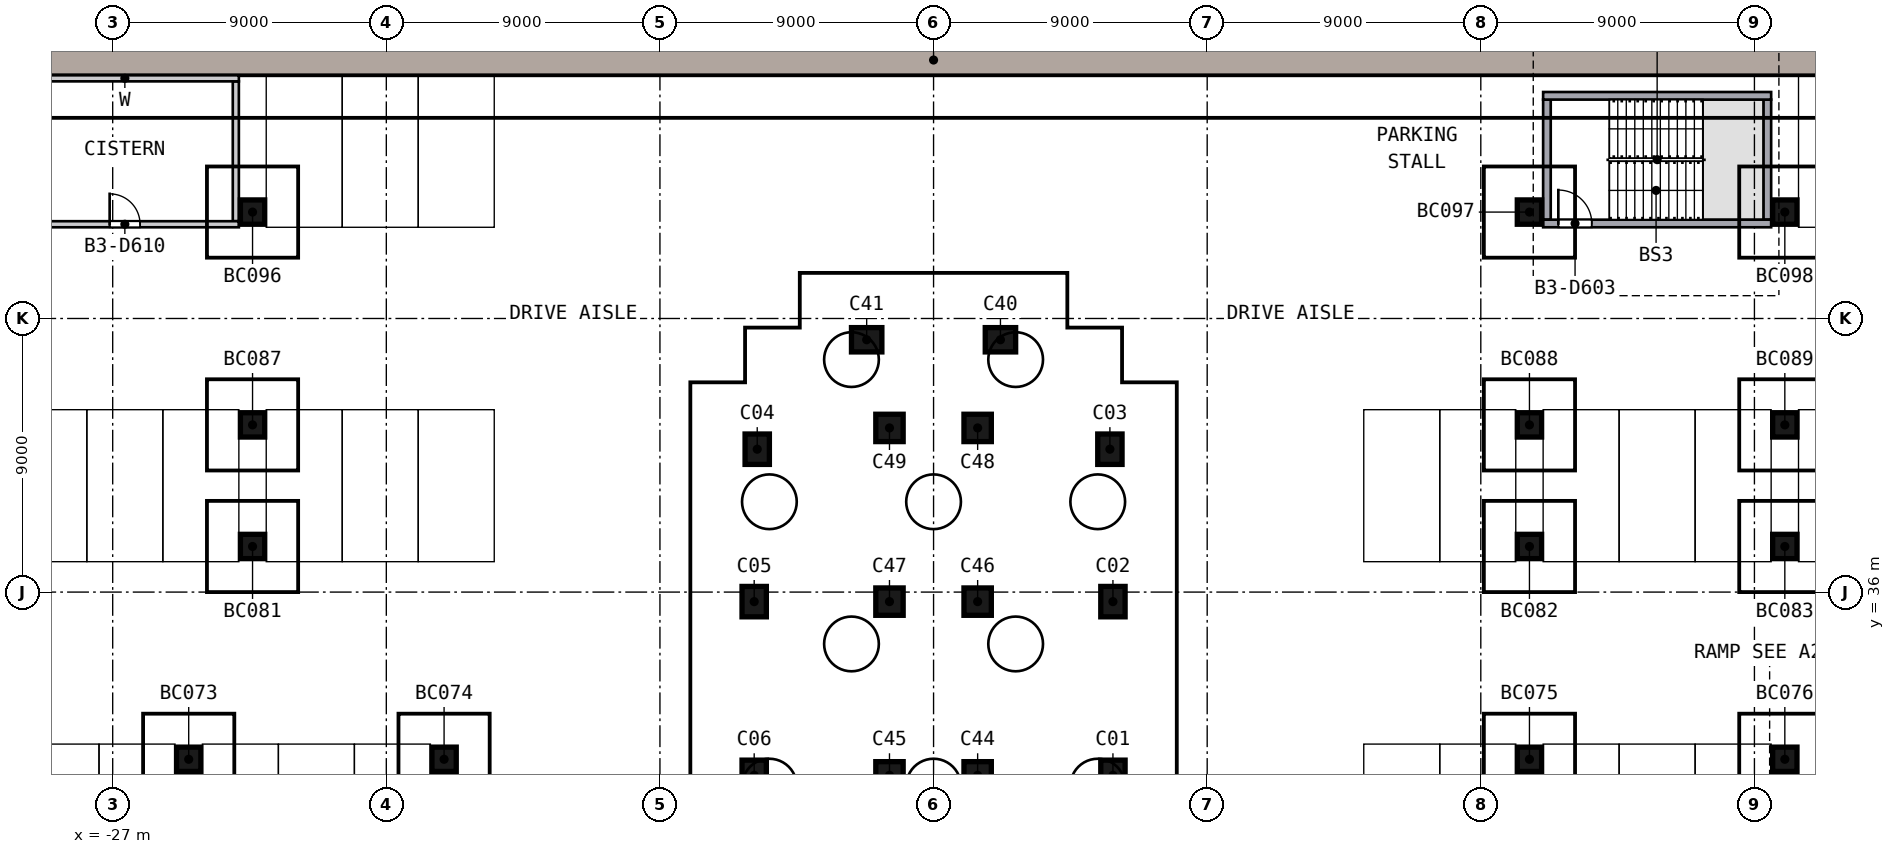
"""IFC4 building model, lengths in metres.
Left out: names, types, materials, properties, quantities, classifications, styles, units other than length and angle.
Written with IfcOpenShell. Run it as: python <this file> out.ifc"""

import sys

from ifc_helpers import new_model, si_unit, direction, frame, frame_2d, origin, origin_2d, place, context, subcontext, project, spatial, polyline, rectangle, outline, extrude, element, fill, save


model = new_model("IFC4")
c1 = context("Model", 3, precision=1e-05, world=origin(), true_north=direction((0.0, 1.0)))
c2 = subcontext(c1, "Body", "Model", "MODEL_VIEW")
j1 = project(units=[si_unit("LENGTHUNIT", "METRE"), si_unit("PLANEANGLEUNIT", "RADIAN")], contexts=[c1])
p1 = place(None, origin())
s1 = spatial("IfcSite", under=j1, at=p1, CompositionType="ELEMENT")
p2 = place(p1, origin())
s2 = spatial("IfcBuilding", under=s1, at=p2, CompositionType="ELEMENT")
p3 = place(p2, frame((0.0, 0.0, -11.7)))
s3 = spatial("IfcBuildingStorey", under=s2, at=p3, CompositionType="ELEMENT", Elevation=-11.7)
for number, where, z_axis, x_axis in (
    (1, (5.9, 29.972, 0.0), (0.0, 0.0, 1.0), (0.0, 1.0, 0.0)),
    (2, (5.9, 35.686, 0.0), (0.0, 0.0, 1.0), (0.0, 1.0, 0.0)),
    (3, (5.8, 40.7, 0.0), (0.0, 0.0, 1.0), (0.0, 1.0, 0.0)),
    (4, (-5.8, 40.7, 0.0), (0.0, 0.0, 1.0), (0.0, -1.0, 0.0)),
    (5, (-5.9, 35.686, 0.0), (0.0, 0.0, 1.0), (0.0, -1.0, 0.0)),
    (6, (-5.9, 29.972, 0.0), (0.0, 0.0, 1.0), (0.0, -1.0, 0.0)),
    (7, (2.2, 44.3, 0.0), (0.0, 0.0, 1.0), (-1.0, 0.0, 0.0)),
    (8, (-2.2, 44.3, 0.0), (0.0, 0.0, 1.0), (-1.0, 0.0, 0.0)),
):
    element("IfcColumn", number, at=place(p3, frame(where, z_axis=z_axis, x_axis=x_axis)), inside=s3, PredefinedType="COLUMN", context=c2, shape_type="SweptSolid", body=[
        extrude(rectangle(XDim=1.0, YDim=0.8, at=origin_2d()), origin(), (0.0, 0.0, 1.0), 3.45),
    ])
for number, where, z_axis, x_axis in (
    (9, (1.45, 29.972, 0.0), (0.0, 0.0, 1.0), (0.0, 1.0, 0.0)),
    (10, (-1.45, 29.972, 0.0), (0.0, 0.0, 1.0), (0.0, 1.0, 0.0)),
    (11, (1.45, 35.686, 0.0), (0.0, 0.0, 1.0), (0.0, 1.0, 0.0)),
    (12, (-1.45, 35.686, 0.0), (0.0, 0.0, 1.0), (0.0, 1.0, 0.0)),
    (13, (1.45, 41.4, 0.0), (0.0, 0.0, 1.0), (0.0, 1.0, 0.0)),
    (14, (-1.45, 41.4, 0.0), (0.0, 0.0, 1.0), (0.0, 1.0, 0.0)),
):
    element("IfcColumn", number, at=place(p3, frame(where, z_axis=z_axis, x_axis=x_axis)), inside=s3, PredefinedType="COLUMN", context=c2, shape_type="SweptSolid", body=[
        extrude(rectangle(XDim=0.9, YDim=0.9, at=origin_2d()), origin(), (0.0, 0.0, 1.0), 3.45),
    ])
p4 = place(p3, frame((0.0, 0.0, -0.8)))
e15 = element("IfcWall", 15, at=p4, inside=s3, PredefinedType="SOLIDWALL", context=c2, shape_type="SweptSolid", body=[
    extrude(outline(polyline([(54.0, 54.0), (-54.0, 54.0), (-53.0, 53.0), (53.0, 53.0), (54.0, 54.0)])), origin(), (0.0, 0.0, 1.0), 4.7),
])
for number, where, z_axis, x_axis in (
    (16, (-24.5, 30.5, -0.8), (0.0, 0.0, 1.0), (1.0, 0.0, 0.0)),
    (17, (-16.1, 30.5, -0.8), (0.0, 0.0, 1.0), (1.0, 0.0, 0.0)),
    (18, (19.6, 30.5, -0.8), (0.0, 0.0, 1.0), (1.0, 0.0, 0.0)),
    (19, (28.0, 30.5, -0.8), (0.0, 0.0, 1.0), (1.0, 0.0, 0.0)),
    (20, (-22.4, 37.5, -0.8), (0.0, 0.0, 1.0), (1.0, 0.0, 0.0)),
    (21, (19.6, 37.5, -0.8), (0.0, 0.0, 1.0), (1.0, 0.0, 0.0)),
    (22, (28.0, 37.5, -0.8), (0.0, 0.0, 1.0), (1.0, 0.0, 0.0)),
    (23, (-22.4, 41.5, -0.8), (0.0, 0.0, 1.0), (1.0, 0.0, 0.0)),
    (24, (19.6, 41.5, -0.8), (0.0, 0.0, 1.0), (1.0, 0.0, 0.0)),
    (25, (28.0, 41.5, -0.8), (0.0, 0.0, 1.0), (1.0, 0.0, 0.0)),
    (26, (-22.4, 48.5, -0.8), (0.0, 0.0, 1.0), (1.0, 0.0, 0.0)),
    (27, (19.6, 48.5, -0.8), (0.0, 0.0, 1.0), (1.0, 0.0, 0.0)),
    (28, (28.0, 48.5, -0.8), (0.0, 0.0, 1.0), (1.0, 0.0, 0.0)),
):
    element("IfcColumn", number, at=place(p3, frame(where, z_axis=z_axis, x_axis=x_axis)), inside=s3, PredefinedType="COLUMN", context=c2, shape_type="SweptSolid", body=[
        extrude(rectangle(XDim=0.8, YDim=0.8, at=origin_2d()), origin(), (0.0, 0.0, 1.0), 4.7),
    ])
p5 = place(p3, frame((20.05, 52.325, 0.0), z_axis=(0.0, 0.0, 1.0), x_axis=(1.0, 0.0, 0.0)))
e29 = element("IfcWall", 29, at=p5, inside=s3, PredefinedType="SOLIDWALL", context=c2, shape_type="SweptSolid", body=[
    extrude(rectangle(XDim=7.5, YDim=0.25, at=frame_2d((3.75, 0.0))), origin(), (0.0, 0.0, 1.0), 3.9),
])
p6 = place(p3, frame((20.05, 48.125, 0.0), z_axis=(0.0, 0.0, 1.0), x_axis=(1.0, 0.0, 0.0)))
e30 = element("IfcWall", 30, at=p6, inside=s3, PredefinedType="SOLIDWALL", context=c2, shape_type="SweptSolid", body=[
    extrude(rectangle(XDim=7.5, YDim=0.25, at=frame_2d((3.75, 0.0))), origin(), (0.0, 0.0, 1.0), 3.9),
])
p7 = place(p6, frame((0.5, 0.0, 0.0)))
e31 = element("IfcOpeningElement", 31, at=p7, cuts=e30, PredefinedType="OPENING", context=c2, shape_type="SweptSolid", body=[
    extrude(rectangle(XDim=1.1, YDim=2.1, at=frame_2d((0.55, 1.05))), frame((0.0, 0.135, 0.0), z_axis=(0.0, -1.0, 0.0), x_axis=(1.0, 0.0, 0.0)), (0.0, 0.0, 1.0), 0.27),
])
for number, where, z_axis, x_axis in (
    (32, (20.175, 48.25, 0.0), (0.0, 0.0, 1.0), (0.0, 1.0, 0.0)),
    (33, (27.425, 48.25, 0.0), (0.0, 0.0, 1.0), (0.0, 1.0, 0.0)),
):
    element("IfcWall", number, at=place(p3, frame(where, z_axis=z_axis, x_axis=x_axis)), inside=s3, PredefinedType="SOLIDWALL", context=c2, shape_type="SweptSolid", body=[
        extrude(rectangle(XDim=3.95, YDim=0.25, at=frame_2d((1.975, 0.0))), origin(), (0.0, 0.0, 1.0), 3.9),
    ])
p8 = place(p3, frame((-30.35, 48.1, 0.0), z_axis=(0.0, 0.0, 1.0), x_axis=(1.0, 0.0, 0.0)))
e34 = element("IfcWall", 34, at=p8, inside=s3, PredefinedType="PARTITIONING", context=c2, shape_type="SweptSolid", body=[
    extrude(rectangle(XDim=7.5, YDim=0.2, at=frame_2d((3.75, 0.0))), origin(), (0.0, 0.0, 1.0), 3.45),
])
p9 = place(p8, frame((3.25, 0.0, 0.0)))
e35 = element("IfcOpeningElement", 35, at=p9, cuts=e34, PredefinedType="OPENING", context=c2, shape_type="SweptSolid", body=[
    extrude(rectangle(XDim=1.0, YDim=2.1, at=frame_2d((0.5, 1.05))), frame((0.0, 0.11, 0.0), z_axis=(0.0, -1.0, 0.0), x_axis=(1.0, 0.0, 0.0)), (0.0, 0.0, 1.0), 0.22),
])
p10 = place(p3, frame((-30.35, 52.9, 0.0), z_axis=(0.0, 0.0, 1.0), x_axis=(1.0, 0.0, 0.0)))
e36 = element("IfcWall", 36, at=p10, inside=s3, PredefinedType="PARTITIONING", context=c2, shape_type="SweptSolid", body=[
    extrude(rectangle(XDim=7.5, YDim=0.2, at=frame_2d((3.75, 0.0))), origin(), (0.0, 0.0, 1.0), 3.45),
])
p11 = place(p3, frame((-22.95, 48.2, 0.0), z_axis=(0.0, 0.0, 1.0), x_axis=(0.0, 1.0, 0.0)))
e37 = element("IfcWall", 37, at=p11, inside=s3, PredefinedType="PARTITIONING", context=c2, shape_type="SweptSolid", body=[
    extrude(rectangle(XDim=4.6, YDim=0.2, at=frame_2d((2.3, 0.0))), origin(), (0.0, 0.0, 1.0), 3.45),
])
p12 = place(p7, origin())
e38 = element("IfcDoor", 38, at=p12, inside=s3, OperationType="SINGLE_SWING_LEFT", PredefinedType="DOOR", context=c2, shape_type="SweptSolid", body=[
    extrude(rectangle(XDim=1.1, YDim=2.1, at=frame_2d((0.55, 1.05))), frame((0.0, 0.025, 0.0), z_axis=(0.0, -1.0, 0.0), x_axis=(1.0, 0.0, 0.0)), (0.0, 0.0, 1.0), 0.05),
])
fill(e31, e38)
p13 = place(p9, origin())
e39 = element("IfcDoor", 39, at=p13, inside=s3, OperationType="SINGLE_SWING_LEFT", PredefinedType="DOOR", context=c2, shape_type="SweptSolid", body=[
    extrude(rectangle(XDim=1.0, YDim=2.1, at=frame_2d((0.5, 1.05))), frame((0.0, 0.025, 0.0), z_axis=(0.0, -1.0, 0.0), x_axis=(1.0, 0.0, 0.0)), (0.0, 0.0, 1.0), 0.05),
])
fill(e35, e39)
save(model, sys.argv[1])
